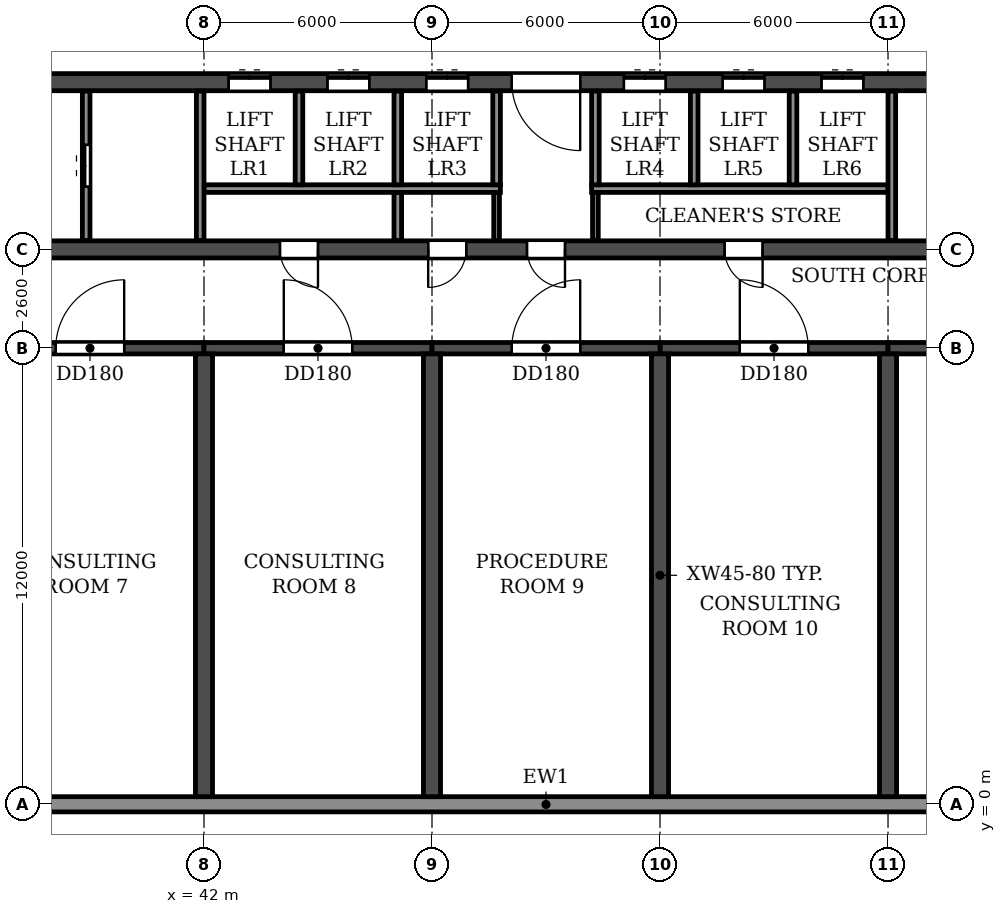
"""IFC4 building model, lengths in metres.
Left out: names, types, materials, properties, quantities, classifications, styles, units other than length and angle.
Written with IfcOpenShell. Run it as: python <this file> out.ifc"""

import sys

from ifc_helpers import new_model, si_unit, direction, frame, frame_2d, origin, place, context, subcontext, project, spatial, rectangle, extrude, element, fill, save


model = new_model("IFC4")
c1 = context("Model", 3, precision=1e-05, world=origin(), true_north=direction((0.0, 1.0)))
c2 = subcontext(c1, "Body", "Model", "MODEL_VIEW")
j1 = project(units=[si_unit("LENGTHUNIT", "METRE"), si_unit("PLANEANGLEUNIT", "RADIAN")], contexts=[c1])
p1 = place(None, origin())
s1 = spatial("IfcSite", under=j1, at=p1, CompositionType="ELEMENT")
p2 = place(p1, origin())
s2 = spatial("IfcBuilding", under=s1, at=p2, CompositionType="ELEMENT")
p3 = place(p2, frame((0.0, 0.0, 6.0)))
s3 = spatial("IfcBuildingStorey", under=s2, at=p3, CompositionType="ELEMENT", Elevation=6.0)
for number, where, z_axis, x_axis in (
    (1, (42.0, 0.2, 0.0), (0.0, 0.0, 1.0), (0.0, 1.0, 0.0)),
    (2, (48.0, 0.2, 0.0), (0.0, 0.0, 1.0), (0.0, 1.0, 0.0)),
    (3, (54.0, 0.2, 0.0), (0.0, 0.0, 1.0), (0.0, 1.0, 0.0)),
    (4, (60.0, 0.2, 0.0), (0.0, 0.0, 1.0), (0.0, 1.0, 0.0)),
):
    element("IfcWall", number, at=place(p3, frame(where, z_axis=z_axis, x_axis=x_axis)), inside=s3, PredefinedType="SHEAR", context=c2, shape_type="SweptSolid", body=[
        extrude(rectangle(XDim=11.65, YDim=0.45, at=frame_2d((5.825, 0.0))), origin(), (0.0, 0.0, 1.0), 4.52),
    ])
p4 = place(p3, frame((36.0, 12.0, 0.0), z_axis=(0.0, 0.0, 1.0), x_axis=(1.0, 0.0, 0.0)))
e5 = element("IfcWall", 5, at=p4, inside=s3, PredefinedType="SHEAR", context=c2, shape_type="SweptSolid", body=[
    extrude(rectangle(XDim=6.0, YDim=0.3, at=frame_2d((3.0, 0.0))), origin(), (0.0, 0.0, 1.0), 3.92),
])
p5 = place(p4, frame((2.1, 0.0, 0.0)))
e6 = element("IfcOpeningElement", 6, at=p5, cuts=e5, PredefinedType="OPENING", context=c2, shape_type="SweptSolid", body=[
    extrude(rectangle(XDim=1.8, YDim=2.1, at=frame_2d((0.9, 1.05))), frame((0.0, 0.16, 0.0), z_axis=(0.0, -1.0, 0.0), x_axis=(1.0, 0.0, 0.0)), (0.0, 0.0, 1.0), 0.32),
])
p6 = place(p3, frame((42.0, 12.0, 0.0), z_axis=(0.0, 0.0, 1.0), x_axis=(1.0, 0.0, 0.0)))
e7 = element("IfcWall", 7, at=p6, inside=s3, PredefinedType="SHEAR", context=c2, shape_type="SweptSolid", body=[
    extrude(rectangle(XDim=6.0, YDim=0.3, at=frame_2d((3.0, 0.0))), origin(), (0.0, 0.0, 1.0), 3.92),
])
p7 = place(p6, frame((2.1, 0.0, 0.0)))
e8 = element("IfcOpeningElement", 8, at=p7, cuts=e7, PredefinedType="OPENING", context=c2, shape_type="SweptSolid", body=[
    extrude(rectangle(XDim=1.8, YDim=2.1, at=frame_2d((0.9, 1.05))), frame((0.0, 0.16, 0.0), z_axis=(0.0, -1.0, 0.0), x_axis=(1.0, 0.0, 0.0)), (0.0, 0.0, 1.0), 0.32),
])
p8 = place(p3, frame((48.0, 12.0, 0.0), z_axis=(0.0, 0.0, 1.0), x_axis=(1.0, 0.0, 0.0)))
e9 = element("IfcWall", 9, at=p8, inside=s3, PredefinedType="SHEAR", context=c2, shape_type="SweptSolid", body=[
    extrude(rectangle(XDim=6.0, YDim=0.3, at=frame_2d((3.0, 0.0))), origin(), (0.0, 0.0, 1.0), 3.92),
])
p9 = place(p8, frame((2.1, 0.0, 0.0)))
e10 = element("IfcOpeningElement", 10, at=p9, cuts=e9, PredefinedType="OPENING", context=c2, shape_type="SweptSolid", body=[
    extrude(rectangle(XDim=1.8, YDim=2.1, at=frame_2d((0.9, 1.05))), frame((0.0, 0.16, 0.0), z_axis=(0.0, -1.0, 0.0), x_axis=(1.0, 0.0, 0.0)), (0.0, 0.0, 1.0), 0.32),
])
p10 = place(p3, frame((54.0, 12.0, 0.0), z_axis=(0.0, 0.0, 1.0), x_axis=(1.0, 0.0, 0.0)))
e11 = element("IfcWall", 11, at=p10, inside=s3, PredefinedType="SHEAR", context=c2, shape_type="SweptSolid", body=[
    extrude(rectangle(XDim=6.0, YDim=0.3, at=frame_2d((3.0, 0.0))), origin(), (0.0, 0.0, 1.0), 3.92),
])
p11 = place(p10, frame((2.1, 0.0, 0.0)))
e12 = element("IfcOpeningElement", 12, at=p11, cuts=e11, PredefinedType="OPENING", context=c2, shape_type="SweptSolid", body=[
    extrude(rectangle(XDim=1.8, YDim=2.1, at=frame_2d((0.9, 1.05))), frame((0.0, 0.16, 0.0), z_axis=(0.0, -1.0, 0.0), x_axis=(1.0, 0.0, 0.0)), (0.0, 0.0, 1.0), 0.32),
])
p12 = place(p3, frame((60.0, 12.0, 0.0), z_axis=(0.0, 0.0, 1.0), x_axis=(1.0, 0.0, 0.0)))
e13 = element("IfcWall", 13, at=p12, inside=s3, PredefinedType="SHEAR", context=c2, shape_type="SweptSolid", body=[
    extrude(rectangle(XDim=6.0, YDim=0.3, at=frame_2d((3.0, 0.0))), origin(), (0.0, 0.0, 1.0), 3.92),
])
p13 = place(p12, frame((2.1, 0.0, 0.0)))
e14 = element("IfcOpeningElement", 14, at=p13, cuts=e13, PredefinedType="OPENING", context=c2, shape_type="SweptSolid", body=[
    extrude(rectangle(XDim=1.8, YDim=2.1, at=frame_2d((0.9, 1.05))), frame((0.0, 0.16, 0.0), z_axis=(0.0, -1.0, 0.0), x_axis=(1.0, 0.0, 0.0)), (0.0, 0.0, 1.0), 0.32),
])
p14 = place(p3, frame((18.0, 14.6, 0.0), z_axis=(0.0, 0.0, 1.0), x_axis=(1.0, 0.0, 0.0)))
e15 = element("IfcWall", 15, at=p14, inside=s3, PredefinedType="SOLIDWALL", context=c2, shape_type="SweptSolid", body=[
    extrude(rectangle(XDim=66.0, YDim=0.45, at=frame_2d((33.0, 0.0))), origin(), (0.0, 0.0, 1.0), 4.52),
])
p15 = place(p14, frame((0.9, 0.0, 0.0)))
e16 = element("IfcOpeningElement", 16, at=p15, cuts=e15, PredefinedType="OPENING", context=c2, shape_type="SweptSolid", body=[
    extrude(rectangle(XDim=1.0, YDim=2.1, at=frame_2d((0.5, 1.05))), frame((0.0, 0.235, 0.0), z_axis=(0.0, -1.0, 0.0), x_axis=(1.0, 0.0, 0.0)), (0.0, 0.0, 1.0), 0.47),
])
p16 = place(p14, frame((8.8, 0.0, 0.0)))
e17 = element("IfcOpeningElement", 17, at=p16, cuts=e15, PredefinedType="OPENING", context=c2, shape_type="SweptSolid", body=[
    extrude(rectangle(XDim=1.0, YDim=2.1, at=frame_2d((0.5, 1.05))), frame((0.0, 0.235, 0.0), z_axis=(0.0, -1.0, 0.0), x_axis=(1.0, 0.0, 0.0)), (0.0, 0.0, 1.0), 0.47),
])
p17 = place(p14, frame((13.4, 0.0, 0.0)))
e18 = element("IfcOpeningElement", 18, at=p17, cuts=e15, PredefinedType="OPENING", context=c2, shape_type="SweptSolid", body=[
    extrude(rectangle(XDim=1.0, YDim=2.1, at=frame_2d((0.5, 1.05))), frame((0.0, 0.235, 0.0), z_axis=(0.0, -1.0, 0.0), x_axis=(1.0, 0.0, 0.0)), (0.0, 0.0, 1.0), 0.47),
])
p18 = place(p14, frame((26.0, 0.0, 0.0)))
e19 = element("IfcOpeningElement", 19, at=p18, cuts=e15, PredefinedType="OPENING", context=c2, shape_type="SweptSolid", body=[
    extrude(rectangle(XDim=1.0, YDim=2.1, at=frame_2d((0.5, 1.05))), frame((0.0, 0.235, 0.0), z_axis=(0.0, -1.0, 0.0), x_axis=(1.0, 0.0, 0.0)), (0.0, 0.0, 1.0), 0.47),
])
p19 = place(p14, frame((29.9, 0.0, 0.0)))
e20 = element("IfcOpeningElement", 20, at=p19, cuts=e15, PredefinedType="OPENING", context=c2, shape_type="SweptSolid", body=[
    extrude(rectangle(XDim=1.0, YDim=2.1, at=frame_2d((0.5, 1.05))), frame((0.0, 0.235, 0.0), z_axis=(0.0, -1.0, 0.0), x_axis=(1.0, 0.0, 0.0)), (0.0, 0.0, 1.0), 0.47),
])
p20 = place(p14, frame((32.5, 0.0, 0.0)))
e21 = element("IfcOpeningElement", 21, at=p20, cuts=e15, PredefinedType="OPENING", context=c2, shape_type="SweptSolid", body=[
    extrude(rectangle(XDim=1.0, YDim=2.1, at=frame_2d((0.5, 1.05))), frame((0.0, 0.235, 0.0), z_axis=(0.0, -1.0, 0.0), x_axis=(1.0, 0.0, 0.0)), (0.0, 0.0, 1.0), 0.47),
])
p21 = place(p14, frame((37.7, 0.0, 0.0)))
e22 = element("IfcOpeningElement", 22, at=p21, cuts=e15, PredefinedType="OPENING", context=c2, shape_type="SweptSolid", body=[
    extrude(rectangle(XDim=1.0, YDim=2.1, at=frame_2d((0.5, 1.05))), frame((0.0, 0.235, 0.0), z_axis=(0.0, -1.0, 0.0), x_axis=(1.0, 0.0, 0.0)), (0.0, 0.0, 1.0), 0.47),
])
p22 = place(p14, frame((51.6, 0.0, 0.0)))
e23 = element("IfcOpeningElement", 23, at=p22, cuts=e15, PredefinedType="OPENING", context=c2, shape_type="SweptSolid", body=[
    extrude(rectangle(XDim=1.0, YDim=2.1, at=frame_2d((0.5, 1.05))), frame((0.0, 0.235, 0.0), z_axis=(0.0, -1.0, 0.0), x_axis=(1.0, 0.0, 0.0)), (0.0, 0.0, 1.0), 0.47),
])
p23 = place(p14, frame((56.2, 0.0, 0.0)))
e24 = element("IfcOpeningElement", 24, at=p23, cuts=e15, PredefinedType="OPENING", context=c2, shape_type="SweptSolid", body=[
    extrude(rectangle(XDim=1.0, YDim=2.1, at=frame_2d((0.5, 1.05))), frame((0.0, 0.235, 0.0), z_axis=(0.0, -1.0, 0.0), x_axis=(1.0, 0.0, 0.0)), (0.0, 0.0, 1.0), 0.47),
])
p24 = place(p14, frame((64.1, 0.0, 0.0)))
e25 = element("IfcOpeningElement", 25, at=p24, cuts=e15, PredefinedType="OPENING", context=c2, shape_type="SweptSolid", body=[
    extrude(rectangle(XDim=1.0, YDim=2.1, at=frame_2d((0.5, 1.05))), frame((0.0, 0.235, 0.0), z_axis=(0.0, -1.0, 0.0), x_axis=(1.0, 0.0, 0.0)), (0.0, 0.0, 1.0), 0.47),
])
p25 = place(p3, frame((33.925, 19.0, 0.0), z_axis=(0.0, 0.0, 1.0), x_axis=(1.0, 0.0, 0.0)))
e26 = element("IfcWall", 26, at=p25, inside=s3, PredefinedType="SOLIDWALL", context=c2, shape_type="SweptSolid", body=[
    extrude(rectangle(XDim=34.15, YDim=0.45, at=frame_2d((17.075, 0.0))), origin(), (0.0, 0.0, 1.0), 4.52),
])
p26 = place(p25, frame((16.175, 0.0, 0.0)))
e27 = element("IfcOpeningElement", 27, at=p26, cuts=e26, PredefinedType="OPENING", context=c2, shape_type="SweptSolid", body=[
    extrude(rectangle(XDim=1.8, YDim=2.1, at=frame_2d((0.9, 1.05))), frame((0.0, 0.235, 0.0), z_axis=(0.0, -1.0, 0.0), x_axis=(1.0, 0.0, 0.0)), (0.0, 0.0, 1.0), 0.47),
])
p27 = place(p25, frame((1.525, 0.0, 0.0)))
e28 = element("IfcOpeningElement", 28, at=p27, cuts=e26, PredefinedType="OPENING", context=c2, shape_type="SweptSolid", body=[
    extrude(rectangle(XDim=1.8, YDim=2.1, at=frame_2d((0.9, 1.05))), frame((0.0, 0.235, 0.0), z_axis=(0.0, -1.0, 0.0), x_axis=(1.0, 0.0, 0.0)), (0.0, 0.0, 1.0), 0.47),
])
p28 = place(p25, frame((8.725, 0.0, 0.0)))
e29 = element("IfcOpeningElement", 29, at=p28, cuts=e26, PredefinedType="OPENING", context=c2, shape_type="SweptSolid", body=[
    extrude(rectangle(XDim=1.1, YDim=2.1, at=frame_2d((0.55, 1.05))), frame((0.0, 0.235, 0.0), z_axis=(0.0, -1.0, 0.0), x_axis=(1.0, 0.0, 0.0)), (0.0, 0.0, 1.0), 0.47),
])
p29 = place(p25, frame((11.325, 0.0, 0.0)))
e30 = element("IfcOpeningElement", 30, at=p29, cuts=e26, PredefinedType="OPENING", context=c2, shape_type="SweptSolid", body=[
    extrude(rectangle(XDim=1.1, YDim=2.1, at=frame_2d((0.55, 1.05))), frame((0.0, 0.235, 0.0), z_axis=(0.0, -1.0, 0.0), x_axis=(1.0, 0.0, 0.0)), (0.0, 0.0, 1.0), 0.47),
])
p30 = place(p25, frame((13.925, 0.0, 0.0)))
e31 = element("IfcOpeningElement", 31, at=p30, cuts=e26, PredefinedType="OPENING", context=c2, shape_type="SweptSolid", body=[
    extrude(rectangle(XDim=1.1, YDim=2.1, at=frame_2d((0.55, 1.05))), frame((0.0, 0.235, 0.0), z_axis=(0.0, -1.0, 0.0), x_axis=(1.0, 0.0, 0.0)), (0.0, 0.0, 1.0), 0.47),
])
p31 = place(p25, frame((19.125, 0.0, 0.0)))
e32 = element("IfcOpeningElement", 32, at=p31, cuts=e26, PredefinedType="OPENING", context=c2, shape_type="SweptSolid", body=[
    extrude(rectangle(XDim=1.1, YDim=2.1, at=frame_2d((0.55, 1.05))), frame((0.0, 0.235, 0.0), z_axis=(0.0, -1.0, 0.0), x_axis=(1.0, 0.0, 0.0)), (0.0, 0.0, 1.0), 0.47),
])
p32 = place(p25, frame((21.725, 0.0, 0.0)))
e33 = element("IfcOpeningElement", 33, at=p32, cuts=e26, PredefinedType="OPENING", context=c2, shape_type="SweptSolid", body=[
    extrude(rectangle(XDim=1.1, YDim=2.1, at=frame_2d((0.55, 1.05))), frame((0.0, 0.235, 0.0), z_axis=(0.0, -1.0, 0.0), x_axis=(1.0, 0.0, 0.0)), (0.0, 0.0, 1.0), 0.47),
])
p33 = place(p25, frame((24.325, 0.0, 0.0)))
e34 = element("IfcOpeningElement", 34, at=p33, cuts=e26, PredefinedType="OPENING", context=c2, shape_type="SweptSolid", body=[
    extrude(rectangle(XDim=1.1, YDim=2.1, at=frame_2d((0.55, 1.05))), frame((0.0, 0.235, 0.0), z_axis=(0.0, -1.0, 0.0), x_axis=(1.0, 0.0, 0.0)), (0.0, 0.0, 1.0), 0.47),
])
p34 = place(p25, frame((30.825, 0.0, 0.0)))
e35 = element("IfcOpeningElement", 35, at=p34, cuts=e26, PredefinedType="OPENING", context=c2, shape_type="SweptSolid", body=[
    extrude(rectangle(XDim=1.8, YDim=2.1, at=frame_2d((0.9, 1.05))), frame((0.0, 0.235, 0.0), z_axis=(0.0, -1.0, 0.0), x_axis=(1.0, 0.0, 0.0)), (0.0, 0.0, 1.0), 0.47),
])
p35 = place(p3, frame((-3.0, 0.0, 0.0), z_axis=(0.0, 0.0, 1.0), x_axis=(1.0, 0.0, 0.0)))
e36 = element("IfcWall", 36, at=p35, inside=s3, PredefinedType="STANDARD", context=c2, shape_type="SweptSolid", body=[
    extrude(rectangle(XDim=108.0, YDim=0.4, at=frame_2d((54.0, 0.0))), origin(), (0.0, 0.0, 1.0), 4.52),
])
for number, where, z_axis, x_axis in (
    (37, (49.7, 14.835, 0.0), (0.0, 0.0, 1.0), (0.0, 1.0, 0.0)),
    (38, (52.3, 14.835, 0.0), (0.0, 0.0, 1.0), (0.0, 1.0, 0.0)),
):
    element("IfcWall", number, at=place(p3, frame(where, z_axis=z_axis, x_axis=x_axis)), inside=s3, PredefinedType="PARTITIONING", context=c2, shape_type="SweptSolid", body=[
        extrude(rectangle(XDim=1.265, YDim=0.15, at=frame_2d((0.633, 0.0))), origin(), (0.0, 0.0, 1.0), 4.52),
    ])
p36 = place(p3, frame((47.1, 14.835, 0.0), z_axis=(0.0, 0.0, 1.0), x_axis=(0.0, 1.0, 0.0)))
e39 = element("IfcWall", 39, at=p36, inside=s3, PredefinedType="PARTITIONING", context=c2, shape_type="SweptSolid", body=[
    extrude(rectangle(XDim=1.265, YDim=0.2, at=frame_2d((0.633, 0.0))), origin(), (0.0, 0.0, 1.0), 4.52),
])
for number, where, z_axis, x_axis in (
    (40, (42.0, 16.2, 0.0), (0.0, 0.0, 1.0), (1.0, 0.0, 0.0)),
    (41, (52.2, 16.2, 0.0), (0.0, 0.0, 1.0), (1.0, 0.0, 0.0)),
):
    element("IfcWall", number, at=place(p3, frame(where, z_axis=z_axis, x_axis=x_axis)), inside=s3, PredefinedType="PARTITIONING", context=c2, shape_type="SweptSolid", body=[
        extrude(rectangle(XDim=7.8, YDim=0.2, at=frame_2d((3.9, 0.0))), origin(), (0.0, 0.0, 1.0), 4.52),
    ])
p37 = place(p3, frame((38.9, 14.835, 0.0), z_axis=(0.0, 0.0, 1.0), x_axis=(0.0, 1.0, 0.0)))
e42 = element("IfcWall", 42, at=p37, inside=s3, PredefinedType="PARTITIONING", context=c2, shape_type="SweptSolid", body=[
    extrude(rectangle(XDim=3.93, YDim=0.2, at=frame_2d((1.965, 0.0))), origin(), (0.0, 0.0, 1.0), 4.52),
])
p38 = place(p37, frame((1.415, 0.0, 0.0)))
e43 = element("IfcOpeningElement", 43, at=p38, cuts=e42, PredefinedType="OPENING", context=c2, shape_type="SweptSolid", body=[
    extrude(rectangle(XDim=1.1, YDim=2.1, at=frame_2d((0.55, 1.05))), frame((0.0, 0.11, 0.0), z_axis=(0.0, -1.0, 0.0), x_axis=(1.0, 0.0, 0.0)), (0.0, 0.0, 1.0), 0.22),
])
p39 = place(p3, frame((41.9, 14.835, 0.0), z_axis=(0.0, 0.0, 1.0), x_axis=(0.0, 1.0, 0.0)))
e44 = element("IfcWall", 44, at=p39, inside=s3, PredefinedType="PARTITIONING", context=c2, shape_type="SweptSolid", body=[
    extrude(rectangle(XDim=3.93, YDim=0.2, at=frame_2d((1.965, 0.0))), origin(), (0.0, 0.0, 1.0), 4.52),
])
for number, where, z_axis, x_axis in (
    (45, (44.5, 16.3, 0.0), (0.0, 0.0, 1.0), (0.0, 1.0, 0.0)),
    (46, (47.1, 16.3, 0.0), (0.0, 0.0, 1.0), (0.0, 1.0, 0.0)),
    (47, (49.7, 16.3, 0.0), (0.0, 0.0, 1.0), (0.0, 1.0, 0.0)),
    (48, (52.3, 16.3, 0.0), (0.0, 0.0, 1.0), (0.0, 1.0, 0.0)),
    (49, (54.9, 16.3, 0.0), (0.0, 0.0, 1.0), (0.0, 1.0, 0.0)),
    (50, (57.5, 16.3, 0.0), (0.0, 0.0, 1.0), (0.0, 1.0, 0.0)),
):
    element("IfcWall", number, at=place(p3, frame(where, z_axis=z_axis, x_axis=x_axis)), inside=s3, PredefinedType="PARTITIONING", context=c2, shape_type="SweptSolid", body=[
        extrude(rectangle(XDim=2.465, YDim=0.2, at=frame_2d((1.232, 0.0))), origin(), (0.0, 0.0, 1.0), 4.52),
    ])
p40 = place(p3, frame((60.1, 14.835, 0.0), z_axis=(0.0, 0.0, 1.0), x_axis=(0.0, 1.0, 0.0)))
e51 = element("IfcWall", 51, at=p40, inside=s3, PredefinedType="PARTITIONING", context=c2, shape_type="SweptSolid", body=[
    extrude(rectangle(XDim=3.93, YDim=0.2, at=frame_2d((1.965, 0.0))), origin(), (0.0, 0.0, 1.0), 4.52),
])
p41 = place(p5, origin())
e52 = element("IfcDoor", 52, at=p41, inside=s3, OperationType="DOUBLE_DOOR_SINGLE_SWING", PredefinedType="DOOR", context=c2, shape_type="SweptSolid", body=[
    extrude(rectangle(XDim=1.8, YDim=2.1, at=frame_2d((0.9, 1.05))), frame((0.0, 0.025, 0.0), z_axis=(0.0, -1.0, 0.0), x_axis=(1.0, 0.0, 0.0)), (0.0, 0.0, 1.0), 0.05),
])
fill(e6, e52)
p42 = place(p18, frame((1.0, 0.0, 0.0), z_axis=(0.0, 0.0, 1.0), x_axis=(-1.0, 0.0, 0.0)))
e53 = element("IfcDoor", 53, at=p42, inside=s3, OperationType="SINGLE_SWING_LEFT", PredefinedType="DOOR", context=c2, shape_type="SweptSolid", body=[
    extrude(rectangle(XDim=1.0, YDim=2.1, at=frame_2d((0.5, 1.05))), frame((0.0, 0.025, 0.0), z_axis=(0.0, -1.0, 0.0), x_axis=(1.0, 0.0, 0.0)), (0.0, 0.0, 1.0), 0.05),
])
fill(e19, e53)
p43 = place(p7, origin())
e54 = element("IfcDoor", 54, at=p43, inside=s3, OperationType="DOUBLE_DOOR_SINGLE_SWING", PredefinedType="DOOR", context=c2, shape_type="SweptSolid", body=[
    extrude(rectangle(XDim=1.8, YDim=2.1, at=frame_2d((0.9, 1.05))), frame((0.0, 0.025, 0.0), z_axis=(0.0, -1.0, 0.0), x_axis=(1.0, 0.0, 0.0)), (0.0, 0.0, 1.0), 0.05),
])
fill(e8, e54)
p44 = place(p19, frame((1.0, 0.0, 0.0), z_axis=(0.0, 0.0, 1.0), x_axis=(-1.0, 0.0, 0.0)))
e55 = element("IfcDoor", 55, at=p44, inside=s3, OperationType="SINGLE_SWING_RIGHT", PredefinedType="DOOR", context=c2, shape_type="SweptSolid", body=[
    extrude(rectangle(XDim=1.0, YDim=2.1, at=frame_2d((0.5, 1.05))), frame((0.0, 0.025, 0.0), z_axis=(0.0, -1.0, 0.0), x_axis=(1.0, 0.0, 0.0)), (0.0, 0.0, 1.0), 0.05),
])
fill(e20, e55)
p45 = place(p9, origin())
e56 = element("IfcDoor", 56, at=p45, inside=s3, OperationType="DOUBLE_DOOR_SINGLE_SWING", PredefinedType="DOOR", context=c2, shape_type="SweptSolid", body=[
    extrude(rectangle(XDim=1.8, YDim=2.1, at=frame_2d((0.9, 1.05))), frame((0.0, 0.025, 0.0), z_axis=(0.0, -1.0, 0.0), x_axis=(1.0, 0.0, 0.0)), (0.0, 0.0, 1.0), 0.05),
])
fill(e10, e56)
p46 = place(p20, frame((1.0, 0.0, 0.0), z_axis=(0.0, 0.0, 1.0), x_axis=(-1.0, 0.0, 0.0)))
e57 = element("IfcDoor", 57, at=p46, inside=s3, OperationType="SINGLE_SWING_LEFT", PredefinedType="DOOR", context=c2, shape_type="SweptSolid", body=[
    extrude(rectangle(XDim=1.0, YDim=2.1, at=frame_2d((0.5, 1.05))), frame((0.0, 0.025, 0.0), z_axis=(0.0, -1.0, 0.0), x_axis=(1.0, 0.0, 0.0)), (0.0, 0.0, 1.0), 0.05),
])
fill(e21, e57)
p47 = place(p21, frame((1.0, 0.0, 0.0), z_axis=(0.0, 0.0, 1.0), x_axis=(-1.0, 0.0, 0.0)))
e58 = element("IfcDoor", 58, at=p47, inside=s3, OperationType="SINGLE_SWING_LEFT", PredefinedType="DOOR", context=c2, shape_type="SweptSolid", body=[
    extrude(rectangle(XDim=1.0, YDim=2.1, at=frame_2d((0.5, 1.05))), frame((0.0, 0.025, 0.0), z_axis=(0.0, -1.0, 0.0), x_axis=(1.0, 0.0, 0.0)), (0.0, 0.0, 1.0), 0.05),
])
fill(e22, e58)
p48 = place(p11, origin())
e59 = element("IfcDoor", 59, at=p48, inside=s3, OperationType="DOUBLE_DOOR_SINGLE_SWING", PredefinedType="DOOR", context=c2, shape_type="SweptSolid", body=[
    extrude(rectangle(XDim=1.8, YDim=2.1, at=frame_2d((0.9, 1.05))), frame((0.0, 0.025, 0.0), z_axis=(0.0, -1.0, 0.0), x_axis=(1.0, 0.0, 0.0)), (0.0, 0.0, 1.0), 0.05),
])
fill(e12, e59)
p49 = place(p38, origin())
e60 = element("IfcDoor", 60, at=p49, inside=s3, OperationType="DOUBLE_DOOR_SLIDING", PredefinedType="DOOR", context=c2, shape_type="SweptSolid", body=[
    extrude(rectangle(XDim=1.1, YDim=2.1, at=frame_2d((0.55, 1.05))), frame((0.0, 0.025, 0.0), z_axis=(0.0, -1.0, 0.0), x_axis=(1.0, 0.0, 0.0)), (0.0, 0.0, 1.0), 0.05),
])
fill(e43, e60)
p50 = place(p26, frame((1.8, 0.0, 0.0), z_axis=(0.0, 0.0, 1.0), x_axis=(-1.0, 0.0, 0.0)))
e61 = element("IfcDoor", 61, at=p50, inside=s3, OperationType="DOUBLE_DOOR_SINGLE_SWING", PredefinedType="DOOR", context=c2, shape_type="SweptSolid", body=[
    extrude(rectangle(XDim=1.8, YDim=2.1, at=frame_2d((0.9, 1.05))), frame((0.0, 0.025, 0.0), z_axis=(0.0, -1.0, 0.0), x_axis=(1.0, 0.0, 0.0)), (0.0, 0.0, 1.0), 0.05),
])
fill(e27, e61)
p51 = place(p28, origin())
e62 = element("IfcDoor", 62, at=p51, inside=s3, OperationType="DOUBLE_DOOR_SLIDING", PredefinedType="DOOR", context=c2, shape_type="SweptSolid", body=[
    extrude(rectangle(XDim=1.1, YDim=2.1, at=frame_2d((0.55, 1.05))), frame((0.0, 0.025, 0.0), z_axis=(0.0, -1.0, 0.0), x_axis=(1.0, 0.0, 0.0)), (0.0, 0.0, 1.0), 0.05),
])
fill(e29, e62)
p52 = place(p29, origin())
e63 = element("IfcDoor", 63, at=p52, inside=s3, OperationType="DOUBLE_DOOR_SLIDING", PredefinedType="DOOR", context=c2, shape_type="SweptSolid", body=[
    extrude(rectangle(XDim=1.1, YDim=2.1, at=frame_2d((0.55, 1.05))), frame((0.0, 0.025, 0.0), z_axis=(0.0, -1.0, 0.0), x_axis=(1.0, 0.0, 0.0)), (0.0, 0.0, 1.0), 0.05),
])
fill(e30, e63)
p53 = place(p30, origin())
e64 = element("IfcDoor", 64, at=p53, inside=s3, OperationType="DOUBLE_DOOR_SLIDING", PredefinedType="DOOR", context=c2, shape_type="SweptSolid", body=[
    extrude(rectangle(XDim=1.1, YDim=2.1, at=frame_2d((0.55, 1.05))), frame((0.0, 0.025, 0.0), z_axis=(0.0, -1.0, 0.0), x_axis=(1.0, 0.0, 0.0)), (0.0, 0.0, 1.0), 0.05),
])
fill(e31, e64)
p54 = place(p31, origin())
e65 = element("IfcDoor", 65, at=p54, inside=s3, OperationType="DOUBLE_DOOR_SLIDING", PredefinedType="DOOR", context=c2, shape_type="SweptSolid", body=[
    extrude(rectangle(XDim=1.1, YDim=2.1, at=frame_2d((0.55, 1.05))), frame((0.0, 0.025, 0.0), z_axis=(0.0, -1.0, 0.0), x_axis=(1.0, 0.0, 0.0)), (0.0, 0.0, 1.0), 0.05),
])
fill(e32, e65)
p55 = place(p32, origin())
e66 = element("IfcDoor", 66, at=p55, inside=s3, OperationType="DOUBLE_DOOR_SLIDING", PredefinedType="DOOR", context=c2, shape_type="SweptSolid", body=[
    extrude(rectangle(XDim=1.1, YDim=2.1, at=frame_2d((0.55, 1.05))), frame((0.0, 0.025, 0.0), z_axis=(0.0, -1.0, 0.0), x_axis=(1.0, 0.0, 0.0)), (0.0, 0.0, 1.0), 0.05),
])
fill(e33, e66)
p56 = place(p33, origin())
e67 = element("IfcDoor", 67, at=p56, inside=s3, OperationType="DOUBLE_DOOR_SLIDING", PredefinedType="DOOR", context=c2, shape_type="SweptSolid", body=[
    extrude(rectangle(XDim=1.1, YDim=2.1, at=frame_2d((0.55, 1.05))), frame((0.0, 0.025, 0.0), z_axis=(0.0, -1.0, 0.0), x_axis=(1.0, 0.0, 0.0)), (0.0, 0.0, 1.0), 0.05),
])
fill(e34, e67)
save(model, sys.argv[1])
